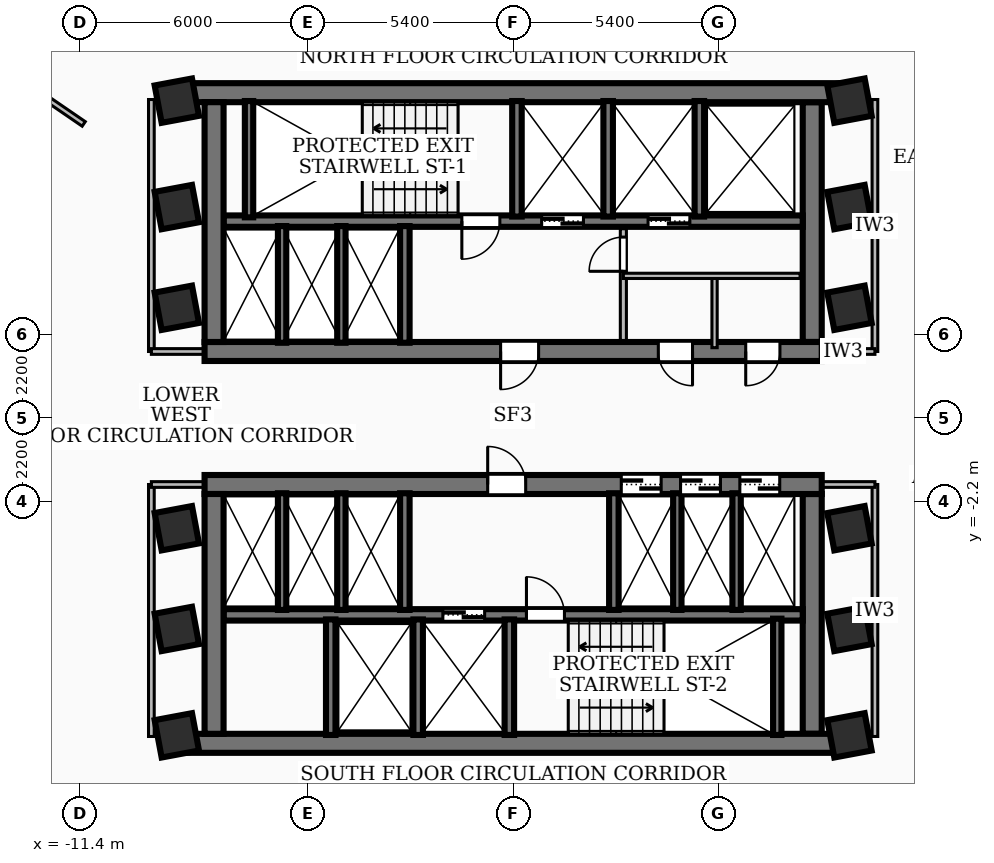
"""IFC4 building model, lengths in metres.
Left out: names, types, materials, properties, quantities, classifications, styles, units other than length and angle.
Written with IfcOpenShell. Run it as: python <this file> out.ifc"""

import sys

from ifc_helpers import new_model, si_unit, direction, frame, frame_2d, origin, origin_2d, place, context, subcontext, project, spatial, rectangle, extrude, element, fill, save


model = new_model("IFC4")
c1 = context("Model", 3, precision=1e-05, world=origin(), true_north=direction((0.0, 1.0)))
c2 = subcontext(c1, "Body", "Model", "MODEL_VIEW")
j1 = project(units=[si_unit("LENGTHUNIT", "METRE"), si_unit("PLANEANGLEUNIT", "RADIAN")], contexts=[c1])
p1 = place(None, origin())
s1 = spatial("IfcSite", under=j1, at=p1, CompositionType="ELEMENT")
p2 = place(p1, origin())
s2 = spatial("IfcBuilding", under=s1, at=p2, CompositionType="ELEMENT")
p3 = place(p2, frame((0.0, 0.0, 103.68)))
s3 = spatial("IfcBuildingStorey", under=s2, at=p3, CompositionType="ELEMENT", Elevation=103.68)
p4 = place(p3, frame((-8.78, 8.56, 0.0), z_axis=(0.0, 0.0, 1.0), x_axis=(1.0, 0.0, 0.0)))
e1 = element("IfcWall", 1, at=p4, inside=s3, PredefinedType="SHEAR", context=c2, shape_type="SweptSolid", body=[
    extrude(rectangle(XDim=17.56, YDim=0.5, at=frame_2d((8.78, 0.0))), origin(), (0.0, 0.0, 1.0), 3.2),
])
p5 = place(p3, frame((8.12, 1.75, 0.0), z_axis=(0.0, 0.0, 1.0), x_axis=(-1.0, 0.0, 0.0)))
e2 = element("IfcWall", 2, at=p5, inside=s3, PredefinedType="SHEAR", context=c2, shape_type="SweptSolid", body=[
    extrude(rectangle(XDim=16.24, YDim=0.5, at=frame_2d((8.12, 0.0))), origin(), (0.0, 0.0, 1.0), 3.2),
])
p6 = place(p5, frame((7.45, 0.0, 0.0)))
e3 = element("IfcOpeningElement", 3, at=p6, cuts=e2, PredefinedType="OPENING", context=c2, shape_type="SweptSolid", body=[
    extrude(rectangle(XDim=1.0, YDim=2.1, at=frame_2d((0.5, 1.05))), frame((0.0, 0.26, 0.0), z_axis=(0.0, -1.0, 0.0), x_axis=(1.0, 0.0, 0.0)), (0.0, 0.0, 1.0), 0.52),
])
p7 = place(p5, frame((3.4, 0.0, 0.0)))
e4 = element("IfcOpeningElement", 4, at=p7, cuts=e2, PredefinedType="OPENING", context=c2, shape_type="SweptSolid", body=[
    extrude(rectangle(XDim=0.9, YDim=2.06, at=frame_2d((0.45, 1.03))), frame((0.0, 0.26, 0.0), z_axis=(0.0, -1.0, 0.0), x_axis=(1.0, 0.0, 0.0)), (0.0, 0.0, 1.0), 0.52),
])
p8 = place(p5, frame((1.1, 0.0, 0.0)))
e5 = element("IfcOpeningElement", 5, at=p8, cuts=e2, PredefinedType="OPENING", context=c2, shape_type="SweptSolid", body=[
    extrude(rectangle(XDim=0.9, YDim=2.06, at=frame_2d((0.45, 1.03))), frame((0.0, 0.26, 0.0), z_axis=(0.0, -1.0, 0.0), x_axis=(1.0, 0.0, 0.0)), (0.0, 0.0, 1.0), 0.52),
])
for number, where, z_axis, x_axis in (
    (6, (-7.87, 2.0, 0.0), (0.0, 0.0, 1.0), (0.0, 1.0, 0.0)),
    (7, (7.87, 8.31, 0.0), (0.0, 0.0, 1.0), (0.0, -1.0, 0.0)),
):
    element("IfcWall", number, at=place(p3, frame(where, z_axis=z_axis, x_axis=x_axis)), inside=s3, PredefinedType="SHEAR", context=c2, shape_type="SweptSolid", body=[
        extrude(rectangle(XDim=6.31, YDim=0.5, at=frame_2d((3.155, 0.0))), origin(), (0.0, 0.0, 1.0), 3.2),
    ])
p9 = place(p3, frame((7.62, 5.18, 0.0), z_axis=(0.0, 0.0, 1.0), x_axis=(-1.0, 0.0, 0.0)))
e8 = element("IfcWall", 8, at=p9, inside=s3, PredefinedType="SOLIDWALL", context=c2, shape_type="SweptSolid", body=[
    extrude(rectangle(XDim=15.24, YDim=0.3, at=frame_2d((7.62, 0.0))), origin(), (0.0, 0.0, 1.0), 3.2),
])
p10 = place(p9, frame((5.77, 0.0, 0.0)))
e9 = element("IfcOpeningElement", 9, at=p10, cuts=e8, PredefinedType="OPENING", context=c2, shape_type="SweptSolid", body=[
    extrude(rectangle(XDim=1.1, YDim=2.15, at=frame_2d((0.55, 1.075))), frame((0.0, 0.16, 0.0), z_axis=(0.0, -1.0, 0.0), x_axis=(1.0, 0.0, 0.0)), (0.0, 0.0, 1.0), 0.32),
])
p11 = place(p9, frame((2.97, 0.0, 0.0)))
e10 = element("IfcOpeningElement", 10, at=p11, cuts=e8, PredefinedType="OPENING", context=c2, shape_type="SweptSolid", body=[
    extrude(rectangle(XDim=1.1, YDim=2.15, at=frame_2d((0.55, 1.075))), frame((0.0, 0.16, 0.0), z_axis=(0.0, -1.0, 0.0), x_axis=(1.0, 0.0, 0.0)), (0.0, 0.0, 1.0), 0.32),
])
p12 = place(p9, frame((7.97, 0.0, 0.0)))
e11 = element("IfcOpeningElement", 11, at=p12, cuts=e8, PredefinedType="OPENING", context=c2, shape_type="SweptSolid", body=[
    extrude(rectangle(XDim=1.0, YDim=2.1, at=frame_2d((0.5, 1.05))), frame((0.0, 0.16, 0.0), z_axis=(0.0, -1.0, 0.0), x_axis=(1.0, 0.0, 0.0)), (0.0, 0.0, 1.0), 0.32),
])
p13 = place(p3, frame((8.78, -8.56, 0.0), z_axis=(0.0, 0.0, 1.0), x_axis=(-1.0, 0.0, 0.0)))
e12 = element("IfcWall", 12, at=p13, inside=s3, PredefinedType="SHEAR", context=c2, shape_type="SweptSolid", body=[
    extrude(rectangle(XDim=17.56, YDim=0.5, at=frame_2d((8.78, 0.0))), origin(), (0.0, 0.0, 1.0), 3.2),
])
p14 = place(p3, frame((-8.12, -1.75, 0.0), z_axis=(0.0, 0.0, 1.0), x_axis=(1.0, 0.0, 0.0)))
e13 = element("IfcWall", 13, at=p14, inside=s3, PredefinedType="SHEAR", context=c2, shape_type="SweptSolid", body=[
    extrude(rectangle(XDim=16.24, YDim=0.5, at=frame_2d((8.12, 0.0))), origin(), (0.0, 0.0, 1.0), 3.2),
])
p15 = place(p14, frame((7.45, 0.0, 0.0)))
e14 = element("IfcOpeningElement", 14, at=p15, cuts=e13, PredefinedType="OPENING", context=c2, shape_type="SweptSolid", body=[
    extrude(rectangle(XDim=1.0, YDim=2.1, at=frame_2d((0.5, 1.05))), frame((0.0, 0.26, 0.0), z_axis=(0.0, -1.0, 0.0), x_axis=(1.0, 0.0, 0.0)), (0.0, 0.0, 1.0), 0.52),
])
p16 = place(p14, frame((10.965, 0.0, 0.0)))
e15 = element("IfcOpeningElement", 15, at=p16, cuts=e13, PredefinedType="OPENING", context=c2, shape_type="SweptSolid", body=[
    extrude(rectangle(XDim=1.05, YDim=2.15, at=frame_2d((0.525, 1.075))), frame((0.0, 0.26, 0.0), z_axis=(0.0, -1.0, 0.0), x_axis=(1.0, 0.0, 0.0)), (0.0, 0.0, 1.0), 0.52),
])
p17 = place(p14, frame((12.525, 0.0, 0.0)))
e16 = element("IfcOpeningElement", 16, at=p17, cuts=e13, PredefinedType="OPENING", context=c2, shape_type="SweptSolid", body=[
    extrude(rectangle(XDim=1.05, YDim=2.15, at=frame_2d((0.525, 1.075))), frame((0.0, 0.26, 0.0), z_axis=(0.0, -1.0, 0.0), x_axis=(1.0, 0.0, 0.0)), (0.0, 0.0, 1.0), 0.52),
])
p18 = place(p14, frame((14.085, 0.0, 0.0)))
e17 = element("IfcOpeningElement", 17, at=p18, cuts=e13, PredefinedType="OPENING", context=c2, shape_type="SweptSolid", body=[
    extrude(rectangle(XDim=1.05, YDim=2.15, at=frame_2d((0.525, 1.075))), frame((0.0, 0.26, 0.0), z_axis=(0.0, -1.0, 0.0), x_axis=(1.0, 0.0, 0.0)), (0.0, 0.0, 1.0), 0.52),
])
for number, where, z_axis, x_axis in (
    (18, (-7.87, -8.31, 0.0), (0.0, 0.0, 1.0), (0.0, 1.0, 0.0)),
    (19, (7.87, -2.0, 0.0), (0.0, 0.0, 1.0), (0.0, -1.0, 0.0)),
):
    element("IfcWall", number, at=place(p3, frame(where, z_axis=z_axis, x_axis=x_axis)), inside=s3, PredefinedType="SHEAR", context=c2, shape_type="SweptSolid", body=[
        extrude(rectangle(XDim=6.31, YDim=0.5, at=frame_2d((3.155, 0.0))), origin(), (0.0, 0.0, 1.0), 3.2),
    ])
p19 = place(p3, frame((-7.62, -5.18, 0.0), z_axis=(0.0, 0.0, 1.0), x_axis=(1.0, 0.0, 0.0)))
e20 = element("IfcWall", 20, at=p19, inside=s3, PredefinedType="SOLIDWALL", context=c2, shape_type="SweptSolid", body=[
    extrude(rectangle(XDim=15.24, YDim=0.3, at=frame_2d((7.62, 0.0))), origin(), (0.0, 0.0, 1.0), 3.2),
])
p20 = place(p19, frame((5.77, 0.0, 0.0)))
e21 = element("IfcOpeningElement", 21, at=p20, cuts=e20, PredefinedType="OPENING", context=c2, shape_type="SweptSolid", body=[
    extrude(rectangle(XDim=1.1, YDim=2.15, at=frame_2d((0.55, 1.075))), frame((0.0, 0.16, 0.0), z_axis=(0.0, -1.0, 0.0), x_axis=(1.0, 0.0, 0.0)), (0.0, 0.0, 1.0), 0.32),
])
p21 = place(p19, frame((7.97, 0.0, 0.0)))
e22 = element("IfcOpeningElement", 22, at=p21, cuts=e20, PredefinedType="OPENING", context=c2, shape_type="SweptSolid", body=[
    extrude(rectangle(XDim=1.0, YDim=2.1, at=frame_2d((0.5, 1.05))), frame((0.0, 0.16, 0.0), z_axis=(0.0, -1.0, 0.0), x_axis=(1.0, 0.0, 0.0)), (0.0, 0.0, 1.0), 0.32),
])
for number, where, z_axis, x_axis in (
    (23, (-6.95, 5.28, 0.0), (0.0, 0.0, 1.0), (0.0, 1.0, 0.0)),
    (24, (6.95, -8.34, 0.0), (0.0, 0.0, 1.0), (0.0, 1.0, 0.0)),
):
    element("IfcWall", number, at=place(p3, frame(where, z_axis=z_axis, x_axis=x_axis)), inside=s3, PredefinedType="SOLIDWALL", context=c2, shape_type="SweptSolid", body=[
        extrude(rectangle(XDim=3.06, YDim=0.22, at=frame_2d((1.53, 0.0))), origin(), (0.0, 0.0, 1.0), 3.2),
    ])
for number, where, z_axis, x_axis in (
    (25, (0.1, 5.3, 0.0), (0.0, 0.0, 1.0), (0.0, 1.0, 0.0)),
    (26, (2.5, 5.3, 0.0), (0.0, 0.0, 1.0), (0.0, 1.0, 0.0)),
    (27, (4.9, 5.3, 0.0), (0.0, 0.0, 1.0), (0.0, 1.0, 0.0)),
):
    element("IfcWall", number, at=place(p3, frame(where, z_axis=z_axis, x_axis=x_axis)), inside=s3, PredefinedType="SOLIDWALL", context=c2, shape_type="SweptSolid", body=[
        extrude(rectangle(XDim=3.04, YDim=0.25, at=frame_2d((1.52, 0.0))), origin(), (0.0, 0.0, 1.0), 3.2),
    ])
p22 = place(p3, frame((-2.85, 1.98, 0.0), z_axis=(0.0, 0.0, 1.0), x_axis=(0.0, 1.0, 0.0)))
e28 = element("IfcWall", 28, at=p22, inside=s3, PredefinedType="SOLIDWALL", context=c2, shape_type="SweptSolid", body=[
    extrude(rectangle(XDim=3.07, YDim=0.25, at=frame_2d((1.535, 0.0))), origin(), (0.0, 0.0, 1.0), 3.2),
])
for number, where, z_axis, x_axis in (
    (29, (-0.1, -8.34, 0.0), (0.0, 0.0, 1.0), (0.0, 1.0, 0.0)),
    (30, (-2.5, -8.34, 0.0), (0.0, 0.0, 1.0), (0.0, 1.0, 0.0)),
    (31, (-4.8, -8.34, 0.0), (0.0, 0.0, 1.0), (0.0, 1.0, 0.0)),
):
    element("IfcWall", number, at=place(p3, frame(where, z_axis=z_axis, x_axis=x_axis)), inside=s3, PredefinedType="SOLIDWALL", context=c2, shape_type="SweptSolid", body=[
        extrude(rectangle(XDim=3.04, YDim=0.25, at=frame_2d((1.52, 0.0))), origin(), (0.0, 0.0, 1.0), 3.2),
    ])
for number, where, z_axis, x_axis in (
    (32, (-2.85, -5.05, 0.0), (0.0, 0.0, 1.0), (0.0, 1.0, 0.0)),
    (33, (2.65, -5.05, 0.0), (0.0, 0.0, 1.0), (0.0, 1.0, 0.0)),
):
    element("IfcWall", number, at=place(p3, frame(where, z_axis=z_axis, x_axis=x_axis)), inside=s3, PredefinedType="SOLIDWALL", context=c2, shape_type="SweptSolid", body=[
        extrude(rectangle(XDim=3.07, YDim=0.25, at=frame_2d((1.535, 0.0))), origin(), (0.0, 0.0, 1.0), 3.2),
    ])
for number, where, z_axis, x_axis in (
    (34, (-6.08, 1.98, 0.0), (0.0, 0.0, 1.0), (0.0, 1.0, 0.0)),
    (35, (-4.52, 1.98, 0.0), (0.0, 0.0, 1.0), (0.0, 1.0, 0.0)),
    (36, (4.32, -5.05, 0.0), (0.0, 0.0, 1.0), (0.0, 1.0, 0.0)),
    (37, (5.88, -5.05, 0.0), (0.0, 0.0, 1.0), (0.0, 1.0, 0.0)),
    (38, (-6.08, -5.05, 0.0), (0.0, 0.0, 1.0), (0.0, 1.0, 0.0)),
    (39, (-4.52, -5.05, 0.0), (0.0, 0.0, 1.0), (0.0, 1.0, 0.0)),
):
    element("IfcWall", number, at=place(p3, frame(where, z_axis=z_axis, x_axis=x_axis)), inside=s3, PredefinedType="SOLIDWALL", context=c2, shape_type="SweptSolid", body=[
        extrude(rectangle(XDim=3.07, YDim=0.22, at=frame_2d((1.535, 0.0))), origin(), (0.0, 0.0, 1.0), 3.2),
    ])
for number, where, z_axis, x_axis in (
    (40, (-8.85, -5.55, 0.0), (0.0, 0.0, 1.0), (0.983, 0.184, 0.0)),
    (41, (-8.85, -2.9, 0.0), (0.0, 0.0, 1.0), (0.983, 0.184, 0.0)),
    (42, (-8.85, 2.9, 0.0), (0.0, 0.0, 1.0), (0.983, 0.184, 0.0)),
    (43, (-8.85, 5.55, 0.0), (0.0, 0.0, 1.0), (0.983, 0.184, 0.0)),
    (44, (8.85, -5.55, 0.0), (0.0, 0.0, 1.0), (0.983, 0.184, 0.0)),
    (45, (8.85, -2.9, 0.0), (0.0, 0.0, 1.0), (0.983, 0.184, 0.0)),
    (46, (8.85, 2.9, 0.0), (0.0, 0.0, 1.0), (0.983, 0.184, 0.0)),
    (47, (8.85, 5.55, 0.0), (0.0, 0.0, 1.0), (0.983, 0.184, 0.0)),
    (48, (-8.85, 8.35, 0.0), (0.0, 0.0, 1.0), (0.983, 0.184, 0.0)),
    (49, (8.85, -8.35, 0.0), (0.0, 0.0, 1.0), (0.983, 0.184, 0.0)),
    (50, (8.85, 8.35, 0.0), (0.0, 0.0, 1.0), (0.983, 0.184, 0.0)),
    (51, (-8.85, -8.35, 0.0), (0.0, 0.0, 1.0), (0.983, 0.184, 0.0)),
):
    element("IfcColumn", number, at=place(p3, frame(where, z_axis=z_axis, x_axis=x_axis)), inside=s3, PredefinedType="COLUMN", context=c2, shape_type="SweptSolid", body=[
        extrude(rectangle(XDim=1.0, YDim=1.0, at=origin_2d()), origin(), (0.0, 0.0, 1.0), 3.6),
    ])
p23 = place(p3, frame((-11.799, -15.393, 0.0), z_axis=(0.0, 0.0, 1.0), x_axis=(-0.184184115697, 0.982891759821, 0.0)))
e52 = element("IfcWall", 52, at=p23, inside=s3, PredefinedType="SOLIDWALL", context=c2, shape_type="SweptSolid", body=[
    extrude(rectangle(XDim=6.776, YDim=0.24, at=frame_2d((3.388, 0.0))), origin(), (0.0, 0.0, 1.0), 3.2),
])
p24 = place(p3, frame((2.9, 2.04, 0.0), z_axis=(0.0, 0.0, 1.0), x_axis=(0.0, 1.0, 0.0)))
e53 = element("IfcWall", 53, at=p24, inside=s3, PredefinedType="PARTITIONING", context=c2, shape_type="SweptSolid", body=[
    extrude(rectangle(XDim=2.94, YDim=0.16, at=frame_2d((1.47, 0.0))), origin(), (0.0, 0.0, 1.0), 2.265),
])
p25 = place(p24, frame((1.82, 0.0, 0.0)))
e54 = element("IfcOpeningElement", 54, at=p25, cuts=e53, PredefinedType="OPENING", context=c2, shape_type="SweptSolid", body=[
    extrude(rectangle(XDim=0.9, YDim=2.06, at=frame_2d((0.45, 1.03))), frame((0.0, 0.09, 0.0), z_axis=(0.0, -1.0, 0.0), x_axis=(1.0, 0.0, 0.0)), (0.0, 0.0, 1.0), 0.18),
])
p26 = place(p3, frame((2.9, 3.74, 0.0), z_axis=(0.0, 0.0, 1.0), x_axis=(1.0, 0.0, 0.0)))
e55 = element("IfcWall", 55, at=p26, inside=s3, PredefinedType="PARTITIONING", context=c2, shape_type="SweptSolid", body=[
    extrude(rectangle(XDim=4.65, YDim=0.138, at=frame_2d((2.325, 0.0))), origin(), (0.0, 0.0, 1.0), 3.2),
])
p27 = place(p3, frame((5.3, 1.85, 0.0), z_axis=(0.0, 0.0, 1.0), x_axis=(0.0, 1.0, 0.0)))
e56 = element("IfcWall", 56, at=p27, inside=s3, PredefinedType="PARTITIONING", context=c2, shape_type="SweptSolid", body=[
    extrude(rectangle(XDim=1.89, YDim=0.138, at=frame_2d((0.945, 0.0))), origin(), (0.0, 0.0, 1.0), 2.265),
])
p28 = place(p3, frame((-9.52, 1.75, 0.0), z_axis=(0.0, 0.0, 1.0), x_axis=(0.0, 1.0, 0.0)))
e57 = element("IfcWall", 57, at=p28, inside=s3, PredefinedType="PARTITIONING", context=c2, shape_type="SweptSolid", body=[
    extrude(rectangle(XDim=6.63, YDim=0.15, at=frame_2d((3.315, 0.0))), origin(), (0.0, 0.0, 1.0), 2.346),
])
p29 = place(p3, frame((-7.85, 1.75, 0.0), z_axis=(0.0, 0.0, 1.0), x_axis=(-1.0, 0.0, 0.0)))
e58 = element("IfcWall", 58, at=p29, inside=s3, PredefinedType="PARTITIONING", context=c2, shape_type="SweptSolid", body=[
    extrude(rectangle(XDim=1.67, YDim=0.15, at=frame_2d((0.835, 0.0))), origin(), (0.0, 0.0, 1.0), 2.265),
])
p30 = place(p3, frame((-9.52, -8.38, 0.0), z_axis=(0.0, 0.0, 1.0), x_axis=(0.0, 1.0, 0.0)))
e59 = element("IfcWall", 59, at=p30, inside=s3, PredefinedType="PARTITIONING", context=c2, shape_type="SweptSolid", body=[
    extrude(rectangle(XDim=6.63, YDim=0.15, at=frame_2d((3.315, 0.0))), origin(), (0.0, 0.0, 1.0), 2.346),
])
p31 = place(p3, frame((-7.85, -1.75, 0.0), z_axis=(0.0, 0.0, 1.0), x_axis=(-1.0, 0.0, 0.0)))
e60 = element("IfcWall", 60, at=p31, inside=s3, PredefinedType="PARTITIONING", context=c2, shape_type="SweptSolid", body=[
    extrude(rectangle(XDim=1.67, YDim=0.15, at=frame_2d((0.835, 0.0))), origin(), (0.0, 0.0, 1.0), 2.265),
])
p32 = place(p3, frame((9.52, 1.75, 0.0), z_axis=(0.0, 0.0, 1.0), x_axis=(0.0, 1.0, 0.0)))
e61 = element("IfcWall", 61, at=p32, inside=s3, PredefinedType="PARTITIONING", context=c2, shape_type="SweptSolid", body=[
    extrude(rectangle(XDim=6.63, YDim=0.15, at=frame_2d((3.315, 0.0))), origin(), (0.0, 0.0, 1.0), 2.346),
])
p33 = place(p3, frame((7.85, 1.75, 0.0), z_axis=(0.0, 0.0, 1.0), x_axis=(1.0, 0.0, 0.0)))
e62 = element("IfcWall", 62, at=p33, inside=s3, PredefinedType="PARTITIONING", context=c2, shape_type="SweptSolid", body=[
    extrude(rectangle(XDim=1.67, YDim=0.15, at=frame_2d((0.835, 0.0))), origin(), (0.0, 0.0, 1.0), 2.265),
])
p34 = place(p3, frame((9.52, -8.38, 0.0), z_axis=(0.0, 0.0, 1.0), x_axis=(0.0, 1.0, 0.0)))
e63 = element("IfcWall", 63, at=p34, inside=s3, PredefinedType="PARTITIONING", context=c2, shape_type="SweptSolid", body=[
    extrude(rectangle(XDim=6.63, YDim=0.15, at=frame_2d((3.315, 0.0))), origin(), (0.0, 0.0, 1.0), 2.346),
])
p35 = place(p3, frame((7.85, -1.75, 0.0), z_axis=(0.0, 0.0, 1.0), x_axis=(1.0, 0.0, 0.0)))
e64 = element("IfcWall", 64, at=p35, inside=s3, PredefinedType="PARTITIONING", context=c2, shape_type="SweptSolid", body=[
    extrude(rectangle(XDim=1.67, YDim=0.15, at=frame_2d((0.835, 0.0))), origin(), (0.0, 0.0, 1.0), 2.265),
])
p36 = place(p3, frame((-11.3, 7.738, 0.0), z_axis=(0.0, 0.0, 1.0), x_axis=(-0.825173577049, 0.564879250584, 0.0)))
e65 = element("IfcWall", 65, at=p36, inside=s3, PredefinedType="PARTITIONING", context=c2, shape_type="SweptSolid", body=[
    extrude(rectangle(XDim=5.959, YDim=0.145, at=frame_2d((2.979, 0.0))), origin(), (0.0, 0.0, 1.0), 3.2),
])
p37 = place(p3, frame((-13.794, -3.975, 0.0), z_axis=(0.0, 0.0, 1.0), x_axis=(0.183947683851, -0.982936035358, 0.0)))
e66 = element("IfcWall", 66, at=p37, inside=s3, PredefinedType="PARTITIONING", context=c2, shape_type="SweptSolid", body=[
    extrude(rectangle(XDim=8.65, YDim=0.145, at=frame_2d((4.325, 0.0))), origin(), (0.0, 0.0, 1.0), 2.346),
])
p38 = place(p6, origin())
e67 = element("IfcDoor", 67, at=p38, inside=s3, OperationType="SINGLE_SWING_RIGHT", PredefinedType="DOOR", context=c2, shape_type="SweptSolid", body=[
    extrude(rectangle(XDim=1.0, YDim=2.1, at=frame_2d((0.5, 1.05))), frame((0.0, 0.025, 0.0), z_axis=(0.0, -1.0, 0.0), x_axis=(1.0, 0.0, 0.0)), (0.0, 0.0, 1.0), 0.05),
])
fill(e3, e67)
p39 = place(p15, origin())
e68 = element("IfcDoor", 68, at=p39, inside=s3, OperationType="SINGLE_SWING_LEFT", PredefinedType="DOOR", context=c2, shape_type="SweptSolid", body=[
    extrude(rectangle(XDim=1.0, YDim=2.1, at=frame_2d((0.5, 1.05))), frame((0.0, 0.025, 0.0), z_axis=(0.0, -1.0, 0.0), x_axis=(1.0, 0.0, 0.0)), (0.0, 0.0, 1.0), 0.05),
])
fill(e14, e68)
p40 = place(p10, origin())
e69 = element("IfcDoor", 69, at=p40, inside=s3, OperationType="DOUBLE_DOOR_SLIDING", PredefinedType="DOOR", context=c2, shape_type="SweptSolid", body=[
    extrude(rectangle(XDim=1.1, YDim=2.15, at=frame_2d((0.55, 1.075))), frame((0.0, 0.025, 0.0), z_axis=(0.0, -1.0, 0.0), x_axis=(1.0, 0.0, 0.0)), (0.0, 0.0, 1.0), 0.05),
])
fill(e9, e69)
p41 = place(p11, origin())
e70 = element("IfcDoor", 70, at=p41, inside=s3, OperationType="DOUBLE_DOOR_SLIDING", PredefinedType="DOOR", context=c2, shape_type="SweptSolid", body=[
    extrude(rectangle(XDim=1.1, YDim=2.15, at=frame_2d((0.55, 1.075))), frame((0.0, 0.025, 0.0), z_axis=(0.0, -1.0, 0.0), x_axis=(1.0, 0.0, 0.0)), (0.0, 0.0, 1.0), 0.05),
])
fill(e10, e70)
p42 = place(p12, origin())
e71 = element("IfcDoor", 71, at=p42, inside=s3, OperationType="SINGLE_SWING_RIGHT", PredefinedType="DOOR", context=c2, shape_type="SweptSolid", body=[
    extrude(rectangle(XDim=1.0, YDim=2.1, at=frame_2d((0.5, 1.05))), frame((0.0, 0.025, 0.0), z_axis=(0.0, -1.0, 0.0), x_axis=(1.0, 0.0, 0.0)), (0.0, 0.0, 1.0), 0.05),
])
fill(e11, e71)
p43 = place(p20, origin())
e72 = element("IfcDoor", 72, at=p43, inside=s3, OperationType="DOUBLE_DOOR_SLIDING", PredefinedType="DOOR", context=c2, shape_type="SweptSolid", body=[
    extrude(rectangle(XDim=1.1, YDim=2.15, at=frame_2d((0.55, 1.075))), frame((0.0, 0.025, 0.0), z_axis=(0.0, -1.0, 0.0), x_axis=(1.0, 0.0, 0.0)), (0.0, 0.0, 1.0), 0.05),
])
fill(e21, e72)
p44 = place(p21, origin())
e73 = element("IfcDoor", 73, at=p44, inside=s3, OperationType="SINGLE_SWING_LEFT", PredefinedType="DOOR", context=c2, shape_type="SweptSolid", body=[
    extrude(rectangle(XDim=1.0, YDim=2.1, at=frame_2d((0.5, 1.05))), frame((0.0, 0.025, 0.0), z_axis=(0.0, -1.0, 0.0), x_axis=(1.0, 0.0, 0.0)), (0.0, 0.0, 1.0), 0.05),
])
fill(e22, e73)
p45 = place(p16, origin())
e74 = element("IfcDoor", 74, at=p45, inside=s3, OperationType="DOUBLE_DOOR_SLIDING", PredefinedType="DOOR", context=c2, shape_type="SweptSolid", body=[
    extrude(rectangle(XDim=1.05, YDim=2.15, at=frame_2d((0.525, 1.075))), frame((0.0, 0.025, 0.0), z_axis=(0.0, -1.0, 0.0), x_axis=(1.0, 0.0, 0.0)), (0.0, 0.0, 1.0), 0.05),
])
fill(e15, e74)
p46 = place(p17, origin())
e75 = element("IfcDoor", 75, at=p46, inside=s3, OperationType="DOUBLE_DOOR_SLIDING", PredefinedType="DOOR", context=c2, shape_type="SweptSolid", body=[
    extrude(rectangle(XDim=1.05, YDim=2.15, at=frame_2d((0.525, 1.075))), frame((0.0, 0.025, 0.0), z_axis=(0.0, -1.0, 0.0), x_axis=(1.0, 0.0, 0.0)), (0.0, 0.0, 1.0), 0.05),
])
fill(e16, e75)
p47 = place(p18, origin())
e76 = element("IfcDoor", 76, at=p47, inside=s3, OperationType="DOUBLE_DOOR_SLIDING", PredefinedType="DOOR", context=c2, shape_type="SweptSolid", body=[
    extrude(rectangle(XDim=1.05, YDim=2.15, at=frame_2d((0.525, 1.075))), frame((0.0, 0.025, 0.0), z_axis=(0.0, -1.0, 0.0), x_axis=(1.0, 0.0, 0.0)), (0.0, 0.0, 1.0), 0.05),
])
fill(e17, e76)
p48 = place(p7, origin())
e77 = element("IfcDoor", 77, at=p48, inside=s3, OperationType="SINGLE_SWING_LEFT", PredefinedType="DOOR", context=c2, shape_type="SweptSolid", body=[
    extrude(rectangle(XDim=0.9, YDim=2.06, at=frame_2d((0.45, 1.03))), frame((0.0, 0.025, 0.0), z_axis=(0.0, -1.0, 0.0), x_axis=(1.0, 0.0, 0.0)), (0.0, 0.0, 1.0), 0.05),
])
fill(e4, e77)
p49 = place(p8, origin())
e78 = element("IfcDoor", 78, at=p49, inside=s3, OperationType="SINGLE_SWING_RIGHT", PredefinedType="DOOR", context=c2, shape_type="SweptSolid", body=[
    extrude(rectangle(XDim=0.9, YDim=2.06, at=frame_2d((0.45, 1.03))), frame((0.0, 0.025, 0.0), z_axis=(0.0, -1.0, 0.0), x_axis=(1.0, 0.0, 0.0)), (0.0, 0.0, 1.0), 0.05),
])
fill(e5, e78)
p50 = place(p25, origin())
e79 = element("IfcDoor", 79, at=p50, inside=s3, OperationType="SINGLE_SWING_LEFT", PredefinedType="DOOR", context=c2, shape_type="SweptSolid", body=[
    extrude(rectangle(XDim=0.9, YDim=2.06, at=frame_2d((0.45, 1.03))), frame((0.0, 0.025, 0.0), z_axis=(0.0, -1.0, 0.0), x_axis=(1.0, 0.0, 0.0)), (0.0, 0.0, 1.0), 0.05),
])
fill(e54, e79)
save(model, sys.argv[1])
